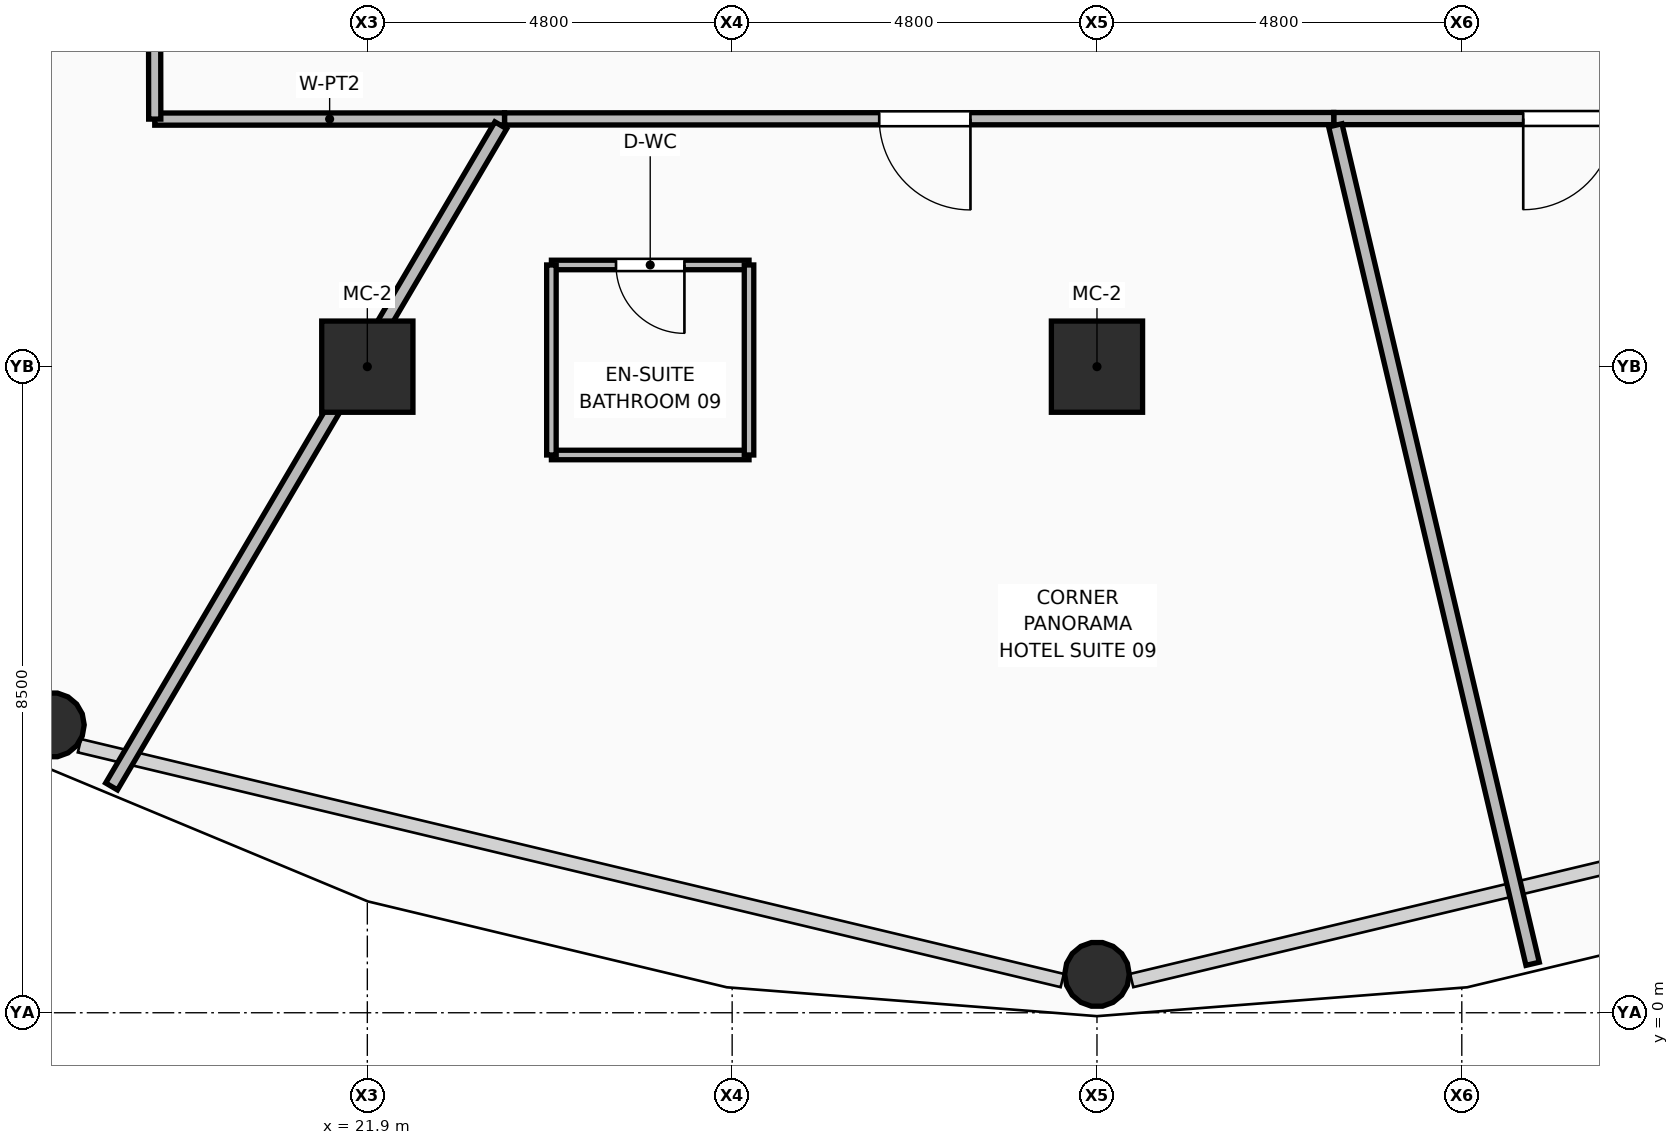
"""IFC4 building model, lengths in metres.
Left out: names, types, materials, properties, quantities, classifications, styles, units other than length and angle.
Written with IfcOpenShell. Run it as: python <this file> out.ifc"""

import sys

from ifc_helpers import new_model, si_unit, direction, frame, frame_2d, origin, origin_2d, place, context, subcontext, project, spatial, rectangle, hollow_rectangle, hollow_circle, extrude, element, fill, save


model = new_model("IFC4")
c1 = context("Model", 3, precision=1e-05, world=origin(), true_north=direction((0.0, 1.0)))
c2 = subcontext(c1, "Body", "Model", "MODEL_VIEW")
j1 = project(units=[si_unit("LENGTHUNIT", "METRE"), si_unit("PLANEANGLEUNIT", "RADIAN")], contexts=[c1])
p1 = place(None, origin())
s1 = spatial("IfcSite", under=j1, at=p1, CompositionType="ELEMENT")
p2 = place(p1, origin())
s2 = spatial("IfcBuilding", under=s1, at=p2, CompositionType="ELEMENT")
p3 = place(p2, frame((0.0, 0.0, 87.0)))
s3 = spatial("IfcBuildingStorey", under=s2, at=p3, CompositionType="ELEMENT", Elevation=87.0)
for number, where, z_axis, x_axis in (
    (1, (21.9, 8.5, 0.0), (0.0, 0.0, 1.0), (1.0, 0.0, 0.0)),
    (2, (31.5, 8.5, 0.0), (0.0, 0.0, 1.0), (1.0, 0.0, 0.0)),
):
    element("IfcColumn", number, at=place(p3, frame(where, z_axis=z_axis, x_axis=x_axis)), inside=s3, PredefinedType="COLUMN", context=c2, shape_type="SweptSolid", body=[
        extrude(hollow_rectangle(XDim=1.2, YDim=1.2, WallThickness=0.045, at=origin_2d()), origin(), (0.0, 0.0, 1.0), 3.75),
    ])
p4 = place(p3, frame((17.75, 3.787, 0.0), z_axis=(0.063867569811, 0.098710723407, 0.993064512814), x_axis=(-0.839585964149, 0.543226848383, 0.0)))
e3 = element("IfcColumn", 3, at=p4, inside=s3, PredefinedType="COLUMN", context=c2, shape_type="SweptSolid", body=[
    extrude(hollow_circle(Radius=0.425, WallThickness=0.04, at=origin_2d()), origin(), (0.0, 0.0, 1.0), 3.524),
])
p5 = place(p3, frame((31.5, 0.505, 0.0), z_axis=(0.0, 0.114134855821, 0.993465265969), x_axis=(-1.0, 0.0, 0.0)))
e4 = element("IfcColumn", 4, at=p5, inside=s3, PredefinedType="COLUMN", context=c2, shape_type="SweptSolid", body=[
    extrude(hollow_circle(Radius=0.425, WallThickness=0.04, at=origin_2d()), origin(), (0.0, 0.0, 1.0), 3.523),
])
p6 = place(p3, frame((40.655, 11.766, 0.0), z_axis=(0.0, 0.0, 1.0), x_axis=(-0.999999933831, -0.000363783323, 0.0)))
e5 = element("IfcWall", 5, at=p6, inside=s3, PredefinedType="PARTITIONING", context=c2, shape_type="SweptSolid", body=[
    extrude(rectangle(XDim=6.04, YDim=0.16, at=frame_2d((3.02, 0.0))), origin(), (0.0, 0.0, 1.0), 3.48),
])
p7 = place(p6, frame((2.347, 0.0, 0.0)))
e6 = element("IfcOpeningElement", 6, at=p7, cuts=e5, PredefinedType="OPENING", context=c2, shape_type="SweptSolid", body=[
    extrude(rectangle(XDim=1.2, YDim=2.1, at=frame_2d((0.6, 1.05))), frame((0.0, 0.09, 0.0), z_axis=(0.0, -1.0, 0.0), x_axis=(1.0, 0.0, 0.0)), (0.0, 0.0, 1.0), 0.18),
])
p8 = place(p3, frame((34.615, 11.764, 0.0), z_axis=(0.0, 0.0, 1.0), x_axis=(-0.999999899846, -0.00044755741, 0.0)))
e7 = element("IfcWall", 7, at=p8, inside=s3, PredefinedType="PARTITIONING", context=c2, shape_type="SweptSolid", body=[
    extrude(rectangle(XDim=10.91, YDim=0.16, at=frame_2d((5.455, 0.0))), origin(), (0.0, 0.0, 1.0), 2.858),
])
p9 = place(p8, frame((4.78, 0.0, 0.0)))
e8 = element("IfcOpeningElement", 8, at=p9, cuts=e7, PredefinedType="OPENING", context=c2, shape_type="SweptSolid", body=[
    extrude(rectangle(XDim=1.2, YDim=2.1, at=frame_2d((0.6, 1.05))), frame((0.0, 0.09, 0.0), z_axis=(0.0, -1.0, 0.0), x_axis=(1.0, 0.0, 0.0)), (0.0, 0.0, 1.0), 0.18),
])
p10 = place(p3, frame((23.705, 11.759, 0.0), z_axis=(0.0, 0.0, 1.0), x_axis=(-0.999999909941, -0.000424403145, 0.0)))
e9 = element("IfcWall", 9, at=p10, inside=s3, PredefinedType="PARTITIONING", context=c2, shape_type="SweptSolid", body=[
    extrude(rectangle(XDim=4.602, YDim=0.16, at=frame_2d((2.301, 0.0))), origin(), (0.0, 0.0, 1.0), 2.858),
])
p11 = place(p3, frame((19.103, 11.757, 0.0), z_axis=(0.0, 0.0, 1.0), x_axis=(-0.001372855369, 0.999999057634, 0.0)))
e10 = element("IfcWall", 10, at=p11, inside=s3, PredefinedType="PARTITIONING", context=c2, shape_type="SweptSolid", body=[
    extrude(rectangle(XDim=8.714, YDim=0.16, at=frame_2d((4.357, 0.0))), origin(), (0.0, 0.0, 1.0), 2.858),
])
p12 = place(p11, frame((6.904, 0.0, 0.0)))
e11 = element("IfcOpeningElement", 11, at=p12, cuts=e10, PredefinedType="OPENING", context=c2, shape_type="SweptSolid", body=[
    extrude(rectangle(XDim=1.2, YDim=2.1, at=frame_2d((0.6, 1.05))), frame((0.0, 0.09, 0.0), z_axis=(0.0, -1.0, 0.0), x_axis=(1.0, 0.0, 0.0)), (0.0, 0.0, 1.0), 0.18),
])
p13 = place(p3, frame((23.656, 11.675, 0.0), z_axis=(0.0, 0.0, 1.0), x_axis=(-0.507360455352, -0.861733931295, 0.0)))
e12 = element("IfcWall", 12, at=p13, inside=s3, PredefinedType="PARTITIONING", context=c2, shape_type="SweptSolid", body=[
    extrude(rectangle(XDim=10.094, YDim=0.18, at=frame_2d((5.047, 0.0))), origin(), (0.0, 0.0, 1.0), 2.705),
])
p14 = place(p3, frame((34.636, 11.675, 0.0), z_axis=(0.0, 0.0, 1.0), x_axis=(0.229074156674, -0.973408974041, 0.0)))
e13 = element("IfcWall", 13, at=p14, inside=s3, PredefinedType="PARTITIONING", context=c2, shape_type="SweptSolid", body=[
    extrude(rectangle(XDim=11.332, YDim=0.18, at=frame_2d((5.666, 0.0))), origin(), (0.0, 0.0, 1.0), 2.705),
])
p15 = place(p3, frame((24.322, 7.338, 0.0), z_axis=(0.0, 0.0, 1.0), x_axis=(1.0, 0.0, 0.0)))
e14 = element("IfcWall", 14, at=p15, inside=s3, PredefinedType="PARTITIONING", context=c2, shape_type="SweptSolid", body=[
    extrude(rectangle(XDim=2.6, YDim=0.125, at=frame_2d((1.3, 0.0))), origin(), (0.0, 0.0, 1.0), 3.48),
])
p16 = place(p3, frame((24.322, 9.838, 0.0), z_axis=(0.0, 0.0, 1.0), x_axis=(1.0, 0.0, 0.0)))
e15 = element("IfcWall", 15, at=p16, inside=s3, PredefinedType="PARTITIONING", context=c2, shape_type="SweptSolid", body=[
    extrude(rectangle(XDim=2.6, YDim=0.125, at=frame_2d((1.3, 0.0))), origin(), (0.0, 0.0, 1.0), 3.48),
])
p17 = place(p16, frame((0.85, 0.0, 0.0)))
e16 = element("IfcOpeningElement", 16, at=p17, cuts=e15, PredefinedType="OPENING", context=c2, shape_type="SweptSolid", body=[
    extrude(rectangle(XDim=0.9, YDim=2.1, at=frame_2d((0.45, 1.05))), frame((0.0, 0.073, 0.0), z_axis=(0.0, -1.0, 0.0), x_axis=(1.0, 0.0, 0.0)), (0.0, 0.0, 1.0), 0.145),
])
for number, where, z_axis, x_axis in (
    (17, (24.322, 7.338, 0.0), (0.0, 0.0, 1.0), (0.0, 1.0, 0.0)),
    (18, (26.922, 7.338, 0.0), (0.0, 0.0, 1.0), (0.0, 1.0, 0.0)),
):
    element("IfcWall", number, at=place(p3, frame(where, z_axis=z_axis, x_axis=x_axis)), inside=s3, PredefinedType="PARTITIONING", context=c2, shape_type="SweptSolid", body=[
        extrude(rectangle(XDim=2.5, YDim=0.125, at=frame_2d((1.25, 0.0))), origin(), (0.0, 0.0, 1.0), 3.48),
    ])
p18 = place(p17, frame((0.9, 0.0, 0.0), z_axis=(0.0, 0.0, 1.0), x_axis=(-1.0, 0.0, 0.0)))
e19 = element("IfcDoor", 19, at=p18, inside=s3, OperationType="SINGLE_SWING_LEFT", PredefinedType="DOOR", context=c2, shape_type="SweptSolid", body=[
    extrude(rectangle(XDim=0.9, YDim=2.1, at=frame_2d((0.45, 1.05))), frame((0.0, 0.025, 0.0), z_axis=(0.0, -1.0, 0.0), x_axis=(1.0, 0.0, 0.0)), (0.0, 0.0, 1.0), 0.05),
])
fill(e16, e19)
p19 = place(p9, origin())
e20 = element("IfcDoor", 20, at=p19, inside=s3, OperationType="SINGLE_SWING_LEFT", PredefinedType="DOOR", context=c2, shape_type="SweptSolid", body=[
    extrude(rectangle(XDim=1.2, YDim=2.1, at=frame_2d((0.6, 1.05))), frame((0.0, 0.025, 0.0), z_axis=(0.0, -1.0, 0.0), x_axis=(1.0, 0.0, 0.0)), (0.0, 0.0, 1.0), 0.05),
])
fill(e8, e20)
p20 = place(p7, origin())
e21 = element("IfcDoor", 21, at=p20, inside=s3, OperationType="SINGLE_SWING_RIGHT", PredefinedType="DOOR", context=c2, shape_type="SweptSolid", body=[
    extrude(rectangle(XDim=1.2, YDim=2.1, at=frame_2d((0.6, 1.05))), frame((0.0, 0.025, 0.0), z_axis=(0.0, -1.0, 0.0), x_axis=(1.0, 0.0, 0.0)), (0.0, 0.0, 1.0), 0.05),
])
fill(e6, e21)
save(model, sys.argv[1])
